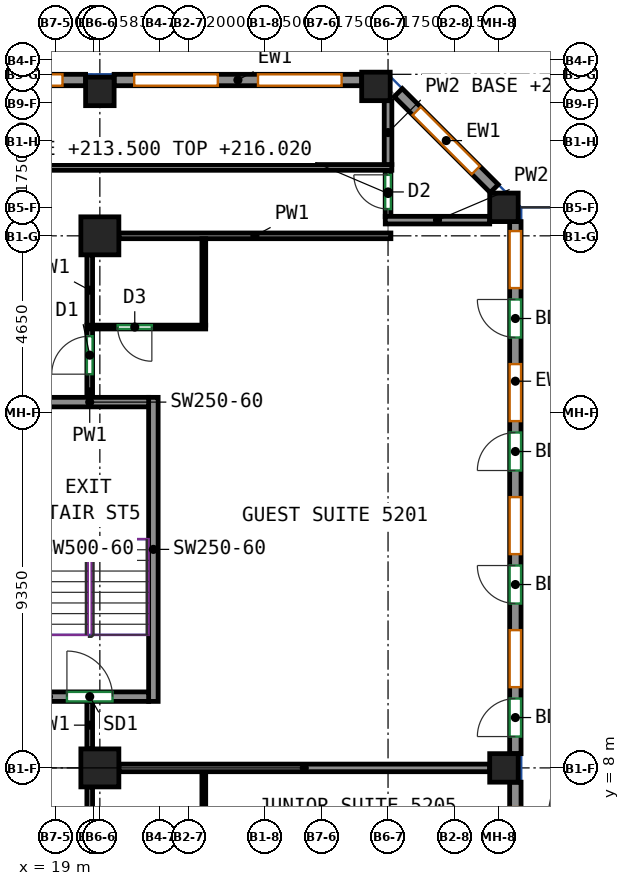
"""IFC4 building model, lengths in metres.
Left out: names, types, materials, properties, quantities, classifications, styles, units other than length and angle.
Written with IfcOpenShell. Run it as: python <this file> out.ifc"""

import sys

from ifc_helpers import new_model, si_unit, direction, frame, frame_2d, origin, origin_2d, place, context, subcontext, project, spatial, rectangle, extrude, source, transform, mapped, element, fill, save


model = new_model("IFC4")
c1 = context("Model", 3, precision=1e-05, world=origin(), true_north=direction((0.0, 1.0)))
c2 = subcontext(c1, "Body", "Model", "MODEL_VIEW")
j1 = project(units=[si_unit("LENGTHUNIT", "METRE"), si_unit("PLANEANGLEUNIT", "RADIAN")], contexts=[c1])
p1 = place(None, origin())
s1 = spatial("IfcSite", under=j1, at=p1, CompositionType="ELEMENT")
p2 = place(p1, origin())
s2 = spatial("IfcBuilding", under=s1, at=p2, CompositionType="ELEMENT")
p3 = place(p2, frame((0.0, 0.0, 213.5)))
s3 = spatial("IfcBuildingStorey", under=s2, at=p3, CompositionType="ELEMENT", Elevation=213.5)
m1 = source(origin(), c2, "Body", "SweptSolid", [
    extrude(rectangle(XDim=1.0, YDim=1.0, at=origin_2d()), origin(), (0.0, 0.0, 1.0), 3.12),
])
for number, where, z_axis, x_axis in (
    (1, (20.167, 8.0, 0.0), (0.0, 0.0, 1.0), (1.0, 0.0, 0.0)),
    (2, (20.167, 22.0, 0.0), (0.0, 0.0, 1.0), (1.0, 0.0, 0.0)),
):
    element("IfcColumn", number, at=place(p3, frame(where, z_axis=z_axis, x_axis=x_axis)), inside=s3, PredefinedType="COLUMN", context=c2, shape_type="MappedRepresentation", body=[
        mapped(m1, transform((0.0, 0.0, 0.0))),
    ])
m2 = source(origin(), c2, "Body", "SweptSolid", [
    extrude(rectangle(XDim=0.75, YDim=0.75, at=origin_2d()), origin(), (0.0, 0.0, 1.0), 3.12),
])
for number, where, z_axis, x_axis in (
    (3, (20.167, 25.8, 0.0), (0.0, 0.0, 1.0), (1.0, 0.0, 0.0)),
    (4, (27.432, 25.932, 0.0), (0.0, 0.0, 1.0), (1.0, 0.0, 0.0)),
    (5, (30.8, 8.0, 0.0), (0.0, 0.0, 1.0), (1.0, 0.0, 0.0)),
    (6, (30.8, 22.75, 0.0), (0.0, 0.0, 1.0), (1.0, 0.0, 0.0)),
):
    element("IfcColumn", number, at=place(p3, frame(where, z_axis=z_axis, x_axis=x_axis)), inside=s3, PredefinedType="COLUMN", context=c2, shape_type="MappedRepresentation", body=[
        mapped(m2, transform((0.0, 0.0, 0.0))),
    ])
m3 = source(origin(), c2, "Body", "SweptSolid", [
    extrude(rectangle(XDim=8.0, YDim=0.25, at=frame_2d((4.0, 0.0))), origin(), (0.0, 0.0, 1.0), 3.12),
])
p4 = place(p3, frame((21.575, 9.75, 0.0), z_axis=(0.0, 0.0, 1.0), x_axis=(0.0, 1.0, 0.0)))
e7 = element("IfcWall", 7, at=p4, inside=s3, PredefinedType="SHEAR", context=c2, shape_type="MappedRepresentation", body=[
    mapped(m3, transform((0.0, 0.0, 0.0))),
])
m4 = source(origin(), c2, "Body", "SweptSolid", [
    extrude(rectangle(XDim=3.1, YDim=0.25, at=frame_2d((1.55, 0.0))), origin(), (0.0, 0.0, 1.0), 3.12),
])
p5 = place(p3, frame((18.35, 9.875, 0.0), z_axis=(0.0, 0.0, 1.0), x_axis=(1.0, 0.0, 0.0)))
e8 = element("IfcWall", 8, at=p5, inside=s3, PredefinedType="SHEAR", context=c2, shape_type="MappedRepresentation", body=[
    mapped(m4, transform((0.0, 0.0, 0.0))),
])
p6 = place(p5, frame((0.95, 0.0, 0.0)))
e9 = element("IfcOpeningElement", 9, at=p6, cuts=e8, PredefinedType="OPENING", context=c2, shape_type="SweptSolid", body=[
    extrude(rectangle(XDim=1.2, YDim=2.1, at=frame_2d((0.6, 1.05))), frame((0.0, 0.135, 0.0), z_axis=(0.0, -1.0, 0.0), x_axis=(1.0, 0.0, 0.0)), (0.0, 0.0, 1.0), 0.27),
])
p7 = place(p3, frame((18.35, 17.625, 0.0), z_axis=(0.0, 0.0, 1.0), x_axis=(1.0, 0.0, 0.0)))
e10 = element("IfcWall", 10, at=p7, inside=s3, PredefinedType="SHEAR", context=c2, shape_type="MappedRepresentation", body=[
    mapped(m4, transform((0.0, 0.0, 0.0))),
])
m5 = source(origin(), c2, "Body", "SweptSolid", [
    extrude(rectangle(XDim=7.812, YDim=0.3, at=frame_2d((3.906, 0.0))), origin(), (0.0, 0.0, 1.0), 3.12),
])
p8 = place(p3, frame((31.1, -0.188, 0.0), z_axis=(0.0, 0.0, 1.0), x_axis=(0.0, 1.0, 0.0)))
e11 = element("IfcWall", 11, at=p8, inside=s3, PredefinedType="SOLIDWALL", context=c2, shape_type="MappedRepresentation", body=[
    mapped(m5, transform((0.0, 0.0, 0.0))),
])
p9 = place(p8, frame((1.75, 0.0, 0.85)))
e12 = element("IfcOpeningElement", 12, at=p9, cuts=e11, PredefinedType="OPENING", context=c2, shape_type="SweptSolid", body=[
    extrude(rectangle(XDim=1.5, YDim=1.95, at=frame_2d((0.75, 0.975))), frame((0.0, 0.16, 0.0), z_axis=(0.0, -1.0, 0.0), x_axis=(1.0, 0.0, 0.0)), (0.0, 0.0, 1.0), 0.32),
])
p10 = place(p8, frame((5.656, 0.0, 0.85)))
e13 = element("IfcOpeningElement", 13, at=p10, cuts=e11, PredefinedType="OPENING", context=c2, shape_type="SweptSolid", body=[
    extrude(rectangle(XDim=1.5, YDim=1.95, at=frame_2d((0.75, 0.975))), frame((0.0, 0.16, 0.0), z_axis=(0.0, -1.0, 0.0), x_axis=(1.0, 0.0, 0.0)), (0.0, 0.0, 1.0), 0.32),
])
m6 = source(origin(), c2, "Body", "SweptSolid", [
    extrude(rectangle(XDim=14.0, YDim=0.3, at=frame_2d((7.0, 0.0))), origin(), (0.0, 0.0, 1.0), 3.12),
])
p11 = place(p3, frame((31.1, 8.375, 0.0), z_axis=(0.0, 0.0, 1.0), x_axis=(0.0, 1.0, 0.0)))
e14 = element("IfcWall", 14, at=p11, inside=s3, PredefinedType="SOLIDWALL", context=c2, shape_type="MappedRepresentation", body=[
    mapped(m6, transform((0.0, 0.0, 0.0))),
])
p12 = place(p11, frame((1.75, 0.0, 0.85)))
e15 = element("IfcOpeningElement", 15, at=p12, cuts=e14, PredefinedType="OPENING", context=c2, shape_type="SweptSolid", body=[
    extrude(rectangle(XDim=1.5, YDim=1.95, at=frame_2d((0.75, 0.975))), frame((0.0, 0.16, 0.0), z_axis=(0.0, -1.0, 0.0), x_axis=(1.0, 0.0, 0.0)), (0.0, 0.0, 1.0), 0.32),
])
p13 = place(p11, frame((0.45, 0.0, 0.0)))
e16 = element("IfcOpeningElement", 16, at=p13, cuts=e14, PredefinedType="OPENING", context=c2, shape_type="SweptSolid", body=[
    extrude(rectangle(XDim=1.0, YDim=2.1, at=frame_2d((0.5, 1.05))), frame((0.0, 0.16, 0.0), z_axis=(0.0, -1.0, 0.0), x_axis=(1.0, 0.0, 0.0)), (0.0, 0.0, 1.0), 0.32),
])
p14 = place(p11, frame((5.25, 0.0, 0.85)))
e17 = element("IfcOpeningElement", 17, at=p14, cuts=e14, PredefinedType="OPENING", context=c2, shape_type="SweptSolid", body=[
    extrude(rectangle(XDim=1.5, YDim=1.95, at=frame_2d((0.75, 0.975))), frame((0.0, 0.16, 0.0), z_axis=(0.0, -1.0, 0.0), x_axis=(1.0, 0.0, 0.0)), (0.0, 0.0, 1.0), 0.32),
])
p15 = place(p11, frame((3.95, 0.0, 0.0)))
e18 = element("IfcOpeningElement", 18, at=p15, cuts=e14, PredefinedType="OPENING", context=c2, shape_type="SweptSolid", body=[
    extrude(rectangle(XDim=1.0, YDim=2.1, at=frame_2d((0.5, 1.05))), frame((0.0, 0.16, 0.0), z_axis=(0.0, -1.0, 0.0), x_axis=(1.0, 0.0, 0.0)), (0.0, 0.0, 1.0), 0.32),
])
p16 = place(p11, frame((8.75, 0.0, 0.85)))
e19 = element("IfcOpeningElement", 19, at=p16, cuts=e14, PredefinedType="OPENING", context=c2, shape_type="SweptSolid", body=[
    extrude(rectangle(XDim=1.5, YDim=1.95, at=frame_2d((0.75, 0.975))), frame((0.0, 0.16, 0.0), z_axis=(0.0, -1.0, 0.0), x_axis=(1.0, 0.0, 0.0)), (0.0, 0.0, 1.0), 0.32),
])
p17 = place(p11, frame((7.45, 0.0, 0.0)))
e20 = element("IfcOpeningElement", 20, at=p17, cuts=e14, PredefinedType="OPENING", context=c2, shape_type="SweptSolid", body=[
    extrude(rectangle(XDim=1.0, YDim=2.1, at=frame_2d((0.5, 1.05))), frame((0.0, 0.16, 0.0), z_axis=(0.0, -1.0, 0.0), x_axis=(1.0, 0.0, 0.0)), (0.0, 0.0, 1.0), 0.32),
])
p18 = place(p11, frame((12.25, 0.0, 0.85)))
e21 = element("IfcOpeningElement", 21, at=p18, cuts=e14, PredefinedType="OPENING", context=c2, shape_type="SweptSolid", body=[
    extrude(rectangle(XDim=1.5, YDim=1.95, at=frame_2d((0.75, 0.975))), frame((0.0, 0.16, 0.0), z_axis=(0.0, -1.0, 0.0), x_axis=(1.0, 0.0, 0.0)), (0.0, 0.0, 1.0), 0.32),
])
p19 = place(p11, frame((10.95, 0.0, 0.0)))
e22 = element("IfcOpeningElement", 22, at=p19, cuts=e14, PredefinedType="OPENING", context=c2, shape_type="SweptSolid", body=[
    extrude(rectangle(XDim=1.0, YDim=2.1, at=frame_2d((0.5, 1.05))), frame((0.0, 0.16, 0.0), z_axis=(0.0, -1.0, 0.0), x_axis=(1.0, 0.0, 0.0)), (0.0, 0.0, 1.0), 0.32),
])
m7 = source(origin(), c2, "Body", "SweptSolid", [
    extrude(rectangle(XDim=3.571, YDim=0.3, at=frame_2d((1.786, 0.0))), origin(), (0.0, 0.0, 1.0), 3.12),
])
p20 = place(p3, frame((30.544, 23.244, 0.0), z_axis=(0.0, 0.0, 1.0), x_axis=(-0.707140964879, 0.707072595841, 0.0)))
e23 = element("IfcWall", 23, at=p20, inside=s3, PredefinedType="SOLIDWALL", context=c2, shape_type="MappedRepresentation", body=[
    mapped(m7, transform((0.0, 0.0, 0.0))),
])
p21 = place(p20, frame((0.686, 0.0, 0.85)))
e24 = element("IfcOpeningElement", 24, at=p21, cuts=e23, PredefinedType="OPENING", context=c2, shape_type="SweptSolid", body=[
    extrude(rectangle(XDim=2.2, YDim=1.95, at=frame_2d((1.1, 0.975))), frame((0.0, 0.16, 0.0), z_axis=(0.0, -1.0, 0.0), x_axis=(1.0, 0.0, 0.0)), (0.0, 0.0, 1.0), 0.32),
])
m8 = source(origin(), c2, "Body", "SweptSolid", [
    extrude(rectangle(XDim=6.515, YDim=0.3, at=frame_2d((3.258, 0.0))), origin(), (0.0, 0.0, 1.0), 3.12),
])
p22 = place(p3, frame((27.057, 26.1, 0.0), z_axis=(0.0, 0.0, 1.0), x_axis=(-1.0, 0.0, 0.0)))
e25 = element("IfcWall", 25, at=p22, inside=s3, PredefinedType="SOLIDWALL", context=c2, shape_type="MappedRepresentation", body=[
    mapped(m8, transform((0.0, 0.0, 0.0))),
])
p23 = place(p22, frame((0.529, 0.0, 0.85)))
e26 = element("IfcOpeningElement", 26, at=p23, cuts=e25, PredefinedType="OPENING", context=c2, shape_type="SweptSolid", body=[
    extrude(rectangle(XDim=2.2, YDim=1.95, at=frame_2d((1.1, 0.975))), frame((0.0, 0.16, 0.0), z_axis=(0.0, -1.0, 0.0), x_axis=(1.0, 0.0, 0.0)), (0.0, 0.0, 1.0), 0.32),
])
p24 = place(p22, frame((3.786, 0.0, 0.85)))
e27 = element("IfcOpeningElement", 27, at=p24, cuts=e25, PredefinedType="OPENING", context=c2, shape_type="SweptSolid", body=[
    extrude(rectangle(XDim=2.2, YDim=1.95, at=frame_2d((1.1, 0.975))), frame((0.0, 0.16, 0.0), z_axis=(0.0, -1.0, 0.0), x_axis=(1.0, 0.0, 0.0)), (0.0, 0.0, 1.0), 0.32),
])
m9 = source(origin(), c2, "Body", "SweptSolid", [
    extrude(rectangle(XDim=6.833, YDim=0.3, at=frame_2d((3.417, 0.0))), origin(), (0.0, 0.0, 1.0), 3.12),
])
p25 = place(p3, frame((19.792, 26.1, 0.0), z_axis=(0.0, 0.0, 1.0), x_axis=(-1.0, 0.0, 0.0)))
e28 = element("IfcWall", 28, at=p25, inside=s3, PredefinedType="SOLIDWALL", context=c2, shape_type="MappedRepresentation", body=[
    mapped(m9, transform((0.0, 0.0, 0.0))),
])
p26 = place(p25, frame((0.608, 0.0, 0.85)))
e29 = element("IfcOpeningElement", 29, at=p26, cuts=e28, PredefinedType="OPENING", context=c2, shape_type="SweptSolid", body=[
    extrude(rectangle(XDim=2.2, YDim=1.95, at=frame_2d((1.1, 0.975))), frame((0.0, 0.16, 0.0), z_axis=(0.0, -1.0, 0.0), x_axis=(1.0, 0.0, 0.0)), (0.0, 0.0, 1.0), 0.32),
])
p27 = place(p25, frame((4.025, 0.0, 0.85)))
e30 = element("IfcOpeningElement", 30, at=p27, cuts=e28, PredefinedType="OPENING", context=c2, shape_type="SweptSolid", body=[
    extrude(rectangle(XDim=2.2, YDim=1.95, at=frame_2d((1.1, 0.975))), frame((0.0, 0.16, 0.0), z_axis=(0.0, -1.0, 0.0), x_axis=(1.0, 0.0, 0.0)), (0.0, 0.0, 1.0), 0.32),
])
p28 = place(p3, frame((19.9, 5.64, 0.0), z_axis=(0.0, 0.0, 1.0), x_axis=(0.0, 1.0, 0.0)))
e31 = element("IfcWall", 31, at=p28, inside=s3, PredefinedType="PARTITIONING", context=c2, shape_type="SweptSolid", body=[
    extrude(rectangle(XDim=1.86, YDim=0.15, at=frame_2d((0.93, 0.0))), origin(), (0.0, 0.0, 1.0), 2.52),
])
p29 = place(p3, frame((19.9, 17.75, 0.0), z_axis=(0.0, 0.0, 1.0), x_axis=(0.0, 1.0, 0.0)))
e32 = element("IfcWall", 32, at=p29, inside=s3, PredefinedType="PARTITIONING", context=c2, shape_type="SweptSolid", body=[
    extrude(rectangle(XDim=1.81, YDim=0.15, at=frame_2d((0.905, 0.0))), origin(), (0.0, 0.0, 1.0), 3.12),
])
p30 = place(p29, frame((0.61, 0.0, 0.0)))
e33 = element("IfcOpeningElement", 33, at=p30, cuts=e32, PredefinedType="OPENING", context=c2, shape_type="SweptSolid", body=[
    extrude(rectangle(XDim=1.0, YDim=2.1, at=frame_2d((0.5, 1.05))), frame((0.0, 0.085, 0.0), z_axis=(0.0, -1.0, 0.0), x_axis=(1.0, 0.0, 0.0)), (0.0, 0.0, 1.0), 0.17),
])
p31 = place(p3, frame((19.9, 8.5, 0.0), z_axis=(0.0, 0.0, 1.0), x_axis=(0.0, 1.0, 0.0)))
e34 = element("IfcWall", 34, at=p31, inside=s3, PredefinedType="PARTITIONING", context=c2, shape_type="SweptSolid", body=[
    extrude(rectangle(XDim=1.25, YDim=0.15, at=frame_2d((0.625, 0.0))), origin(), (0.0, 0.0, 1.0), 3.12),
])
p32 = place(p3, frame((20.667, 22.0, 0.0), z_axis=(0.0, 0.0, 1.0), x_axis=(1.0, 0.0, 0.0)))
e35 = element("IfcWall", 35, at=p32, inside=s3, PredefinedType="PARTITIONING", context=c2, shape_type="SweptSolid", body=[
    extrude(rectangle(XDim=7.158, YDim=0.15, at=frame_2d((3.579, 0.0))), origin(), (0.0, 0.0, 1.0), 3.12),
])
p33 = place(p3, frame((19.9, 19.64, 0.0), z_axis=(0.0, 0.0, 1.0), x_axis=(0.0, 1.0, 0.0)))
e36 = element("IfcWall", 36, at=p33, inside=s3, PredefinedType="PARTITIONING", context=c2, shape_type="SweptSolid", body=[
    extrude(rectangle(XDim=1.86, YDim=0.15, at=frame_2d((0.93, 0.0))), origin(), (0.0, 0.0, 1.0), 3.12),
])
p34 = place(p3, frame((27.75, 22.503, 0.0), z_axis=(0.0, 0.0, 1.0), x_axis=(0.0, 1.0, 0.0)))
e37 = element("IfcWall", 37, at=p34, inside=s3, PredefinedType="PARTITIONING", context=c2, shape_type="SweptSolid", body=[
    extrude(rectangle(XDim=1.222, YDim=0.15, at=frame_2d((0.611, 0.0))), origin(), (0.0, 0.0, 1.0), 2.52),
])
p35 = place(p34, frame((0.202, 0.0, 0.0)))
e38 = element("IfcOpeningElement", 38, at=p35, cuts=e37, PredefinedType="OPENING", context=c2, shape_type="SweptSolid", body=[
    extrude(rectangle(XDim=0.9, YDim=2.1, at=frame_2d((0.45, 1.05))), frame((0.0, 0.085, 0.0), z_axis=(0.0, -1.0, 0.0), x_axis=(1.0, 0.0, 0.0)), (0.0, 0.0, 1.0), 0.17),
])
p36 = place(p3, frame((27.85, 23.8, 0.0), z_axis=(0.0, 0.0, 1.0), x_axis=(-1.0, 0.0, 0.0)))
e39 = element("IfcWall", 39, at=p36, inside=s3, PredefinedType="PARTITIONING", context=c2, shape_type="SweptSolid", body=[
    extrude(rectangle(XDim=45.7, YDim=0.15, at=frame_2d((22.85, 0.0))), origin(), (0.0, 0.0, 1.0), 3.12),
])
p37 = place(p36, frame((16.838, 0.0, 0.0)))
e40 = element("IfcOpeningElement", 40, at=p37, cuts=e39, PredefinedType="OPENING", context=c2, shape_type="SweptSolid", body=[
    extrude(rectangle(XDim=1.0, YDim=2.1, at=frame_2d((0.5, 1.05))), frame((0.0, 0.085, 0.0), z_axis=(0.0, -1.0, 0.0), x_axis=(1.0, 0.0, 0.0)), (0.0, 0.0, 1.0), 0.17),
])
p38 = place(p3, frame((22.902, 5.65, 0.0), z_axis=(0.0, 0.0, 1.0), x_axis=(0.0, 1.0, 0.0)))
e41 = element("IfcWall", 41, at=p38, inside=s3, PredefinedType="PARTITIONING", context=c2, shape_type="SweptSolid", body=[
    extrude(rectangle(XDim=2.25, YDim=0.1, at=frame_2d((1.125, 0.0))), origin(), (0.0, 0.0, 1.0), 3.12),
])
p39 = place(p3, frame((20.667, 8.0, 0.0), z_axis=(0.0, 0.0, 1.0), x_axis=(1.0, 0.0, 0.0)))
e42 = element("IfcWall", 42, at=p39, inside=s3, PredefinedType="PARTITIONING", context=c2, shape_type="SweptSolid", body=[
    extrude(rectangle(XDim=9.758, YDim=0.2, at=frame_2d((4.879, 0.0))), origin(), (0.0, 0.0, 1.0), 2.52),
])
p40 = place(p3, frame((22.952, 19.6, 0.0), z_axis=(0.0, 0.0, 1.0), x_axis=(-1.0, 0.0, 0.0)))
e43 = element("IfcWall", 43, at=p40, inside=s3, PredefinedType="PARTITIONING", context=c2, shape_type="SweptSolid", body=[
    extrude(rectangle(XDim=3.125, YDim=0.1, at=frame_2d((1.562, 0.0))), origin(), (0.0, 0.0, 1.0), 3.12),
])
p41 = place(p40, frame((1.417, 0.0, 0.0)))
e44 = element("IfcOpeningElement", 44, at=p41, cuts=e43, PredefinedType="OPENING", context=c2, shape_type="SweptSolid", body=[
    extrude(rectangle(XDim=0.9, YDim=2.1, at=frame_2d((0.45, 1.05))), frame((0.0, 0.06, 0.0), z_axis=(0.0, -1.0, 0.0), x_axis=(1.0, 0.0, 0.0)), (0.0, 0.0, 1.0), 0.12),
])
p42 = place(p3, frame((22.902, 19.65, 0.0), z_axis=(0.0, 0.0, 1.0), x_axis=(0.0, 1.0, 0.0)))
e45 = element("IfcWall", 45, at=p42, inside=s3, PredefinedType="PARTITIONING", context=c2, shape_type="SweptSolid", body=[
    extrude(rectangle(XDim=2.273, YDim=0.1, at=frame_2d((1.137, 0.0))), origin(), (0.0, 0.0, 1.0), 3.12),
])
p43 = place(p3, frame((30.425, 22.413, 0.0), z_axis=(0.0, 0.0, 1.0), x_axis=(-1.0, 0.0, 0.0)))
e46 = element("IfcWall", 46, at=p43, inside=s3, PredefinedType="PARTITIONING", context=c2, shape_type="SweptSolid", body=[
    extrude(rectangle(XDim=2.748, YDim=0.2, at=frame_2d((1.374, 0.0))), origin(), (0.0, 0.0, 1.0), 2.52),
])
p44 = place(p3, frame((27.75, 25.557, 0.0), z_axis=(0.0, 0.0, 1.0), x_axis=(0.0, -1.0, 0.0)))
e47 = element("IfcWall", 47, at=p44, inside=s3, PredefinedType="PARTITIONING", context=c2, shape_type="SweptSolid", body=[
    extrude(rectangle(XDim=1.68, YDim=0.2, at=frame_2d((0.84, 0.0))), origin(), (0.0, 0.0, 1.0), 2.52),
])
p45 = place(p12, origin())
e48 = element("IfcWindow", 48, at=p45, inside=s3, PartitioningType="SINGLE_PANEL", PredefinedType="WINDOW", context=c2, shape_type="SweptSolid", body=[
    extrude(rectangle(XDim=1.5, YDim=1.95, at=frame_2d((0.75, 0.975))), frame((0.0, 0.03, 0.0), z_axis=(0.0, -1.0, 0.0), x_axis=(1.0, 0.0, 0.0)), (0.0, 0.0, 1.0), 0.06),
])
fill(e15, e48)
p46 = place(p13, origin())
e49 = element("IfcDoor", 49, at=p46, inside=s3, OperationType="SINGLE_SWING_LEFT", PredefinedType="DOOR", context=c2, shape_type="SweptSolid", body=[
    extrude(rectangle(XDim=1.0, YDim=2.1, at=frame_2d((0.5, 1.05))), frame((0.0, 0.025, 0.0), z_axis=(0.0, -1.0, 0.0), x_axis=(1.0, 0.0, 0.0)), (0.0, 0.0, 1.0), 0.05),
])
fill(e16, e49)
p47 = place(p14, origin())
e50 = element("IfcWindow", 50, at=p47, inside=s3, PartitioningType="SINGLE_PANEL", PredefinedType="WINDOW", context=c2, shape_type="SweptSolid", body=[
    extrude(rectangle(XDim=1.5, YDim=1.95, at=frame_2d((0.75, 0.975))), frame((0.0, 0.03, 0.0), z_axis=(0.0, -1.0, 0.0), x_axis=(1.0, 0.0, 0.0)), (0.0, 0.0, 1.0), 0.06),
])
fill(e17, e50)
p48 = place(p15, origin())
e51 = element("IfcDoor", 51, at=p48, inside=s3, OperationType="SINGLE_SWING_RIGHT", PredefinedType="DOOR", context=c2, shape_type="SweptSolid", body=[
    extrude(rectangle(XDim=1.0, YDim=2.1, at=frame_2d((0.5, 1.05))), frame((0.0, 0.025, 0.0), z_axis=(0.0, -1.0, 0.0), x_axis=(1.0, 0.0, 0.0)), (0.0, 0.0, 1.0), 0.05),
])
fill(e18, e51)
p49 = place(p16, origin())
e52 = element("IfcWindow", 52, at=p49, inside=s3, PartitioningType="SINGLE_PANEL", PredefinedType="WINDOW", context=c2, shape_type="SweptSolid", body=[
    extrude(rectangle(XDim=1.5, YDim=1.95, at=frame_2d((0.75, 0.975))), frame((0.0, 0.03, 0.0), z_axis=(0.0, -1.0, 0.0), x_axis=(1.0, 0.0, 0.0)), (0.0, 0.0, 1.0), 0.06),
])
fill(e19, e52)
p50 = place(p17, origin())
e53 = element("IfcDoor", 53, at=p50, inside=s3, OperationType="SINGLE_SWING_LEFT", PredefinedType="DOOR", context=c2, shape_type="SweptSolid", body=[
    extrude(rectangle(XDim=1.0, YDim=2.1, at=frame_2d((0.5, 1.05))), frame((0.0, 0.025, 0.0), z_axis=(0.0, -1.0, 0.0), x_axis=(1.0, 0.0, 0.0)), (0.0, 0.0, 1.0), 0.05),
])
fill(e20, e53)
p51 = place(p18, origin())
e54 = element("IfcWindow", 54, at=p51, inside=s3, PartitioningType="SINGLE_PANEL", PredefinedType="WINDOW", context=c2, shape_type="SweptSolid", body=[
    extrude(rectangle(XDim=1.5, YDim=1.95, at=frame_2d((0.75, 0.975))), frame((0.0, 0.03, 0.0), z_axis=(0.0, -1.0, 0.0), x_axis=(1.0, 0.0, 0.0)), (0.0, 0.0, 1.0), 0.06),
])
fill(e21, e54)
p52 = place(p19, origin())
e55 = element("IfcDoor", 55, at=p52, inside=s3, OperationType="SINGLE_SWING_RIGHT", PredefinedType="DOOR", context=c2, shape_type="SweptSolid", body=[
    extrude(rectangle(XDim=1.0, YDim=2.1, at=frame_2d((0.5, 1.05))), frame((0.0, 0.025, 0.0), z_axis=(0.0, -1.0, 0.0), x_axis=(1.0, 0.0, 0.0)), (0.0, 0.0, 1.0), 0.05),
])
fill(e22, e55)
p53 = place(p21, origin())
e56 = element("IfcWindow", 56, at=p53, inside=s3, PartitioningType="SINGLE_PANEL", PredefinedType="WINDOW", context=c2, shape_type="SweptSolid", body=[
    extrude(rectangle(XDim=2.2, YDim=1.95, at=frame_2d((1.1, 0.975))), frame((0.0, 0.03, 0.0), z_axis=(0.0, -1.0, 0.0), x_axis=(1.0, 0.0, 0.0)), (0.0, 0.0, 1.0), 0.06),
])
fill(e24, e56)
p54 = place(p23, origin())
e57 = element("IfcWindow", 57, at=p54, inside=s3, PartitioningType="SINGLE_PANEL", PredefinedType="WINDOW", context=c2, shape_type="SweptSolid", body=[
    extrude(rectangle(XDim=2.2, YDim=1.95, at=frame_2d((1.1, 0.975))), frame((0.0, 0.03, 0.0), z_axis=(0.0, -1.0, 0.0), x_axis=(1.0, 0.0, 0.0)), (0.0, 0.0, 1.0), 0.06),
])
fill(e26, e57)
p55 = place(p24, origin())
e58 = element("IfcWindow", 58, at=p55, inside=s3, PartitioningType="SINGLE_PANEL", PredefinedType="WINDOW", context=c2, shape_type="SweptSolid", body=[
    extrude(rectangle(XDim=2.2, YDim=1.95, at=frame_2d((1.1, 0.975))), frame((0.0, 0.03, 0.0), z_axis=(0.0, -1.0, 0.0), x_axis=(1.0, 0.0, 0.0)), (0.0, 0.0, 1.0), 0.06),
])
fill(e27, e58)
p56 = place(p26, origin())
e59 = element("IfcWindow", 59, at=p56, inside=s3, PartitioningType="SINGLE_PANEL", PredefinedType="WINDOW", context=c2, shape_type="SweptSolid", body=[
    extrude(rectangle(XDim=2.2, YDim=1.95, at=frame_2d((1.1, 0.975))), frame((0.0, 0.03, 0.0), z_axis=(0.0, -1.0, 0.0), x_axis=(1.0, 0.0, 0.0)), (0.0, 0.0, 1.0), 0.06),
])
fill(e29, e59)
p57 = place(p6, origin())
e60 = element("IfcDoor", 60, at=p57, inside=s3, OperationType="DOUBLE_DOOR_SINGLE_SWING", PredefinedType="DOOR", context=c2, shape_type="SweptSolid", body=[
    extrude(rectangle(XDim=1.2, YDim=2.1, at=frame_2d((0.6, 1.05))), frame((0.0, 0.025, 0.0), z_axis=(0.0, -1.0, 0.0), x_axis=(1.0, 0.0, 0.0)), (0.0, 0.0, 1.0), 0.05),
])
fill(e9, e60)
p58 = place(p30, origin())
e61 = element("IfcDoor", 61, at=p58, inside=s3, OperationType="SINGLE_SWING_LEFT", PredefinedType="DOOR", context=c2, shape_type="SweptSolid", body=[
    extrude(rectangle(XDim=1.0, YDim=2.1, at=frame_2d((0.5, 1.05))), frame((0.0, 0.025, 0.0), z_axis=(0.0, -1.0, 0.0), x_axis=(1.0, 0.0, 0.0)), (0.0, 0.0, 1.0), 0.05),
])
fill(e33, e61)
p59 = place(p41, origin())
e62 = element("IfcDoor", 62, at=p59, inside=s3, OperationType="SINGLE_SWING_LEFT", PredefinedType="DOOR", context=c2, shape_type="SweptSolid", body=[
    extrude(rectangle(XDim=0.9, YDim=2.1, at=frame_2d((0.45, 1.05))), frame((0.0, 0.025, 0.0), z_axis=(0.0, -1.0, 0.0), x_axis=(1.0, 0.0, 0.0)), (0.0, 0.0, 1.0), 0.05),
])
fill(e44, e62)
p60 = place(p35, origin())
e63 = element("IfcDoor", 63, at=p60, inside=s3, OperationType="SINGLE_SWING_RIGHT", PredefinedType="DOOR", context=c2, shape_type="SweptSolid", body=[
    extrude(rectangle(XDim=0.9, YDim=2.1, at=frame_2d((0.45, 1.05))), frame((0.0, 0.025, 0.0), z_axis=(0.0, -1.0, 0.0), x_axis=(1.0, 0.0, 0.0)), (0.0, 0.0, 1.0), 0.05),
])
fill(e38, e63)
save(model, sys.argv[1])
